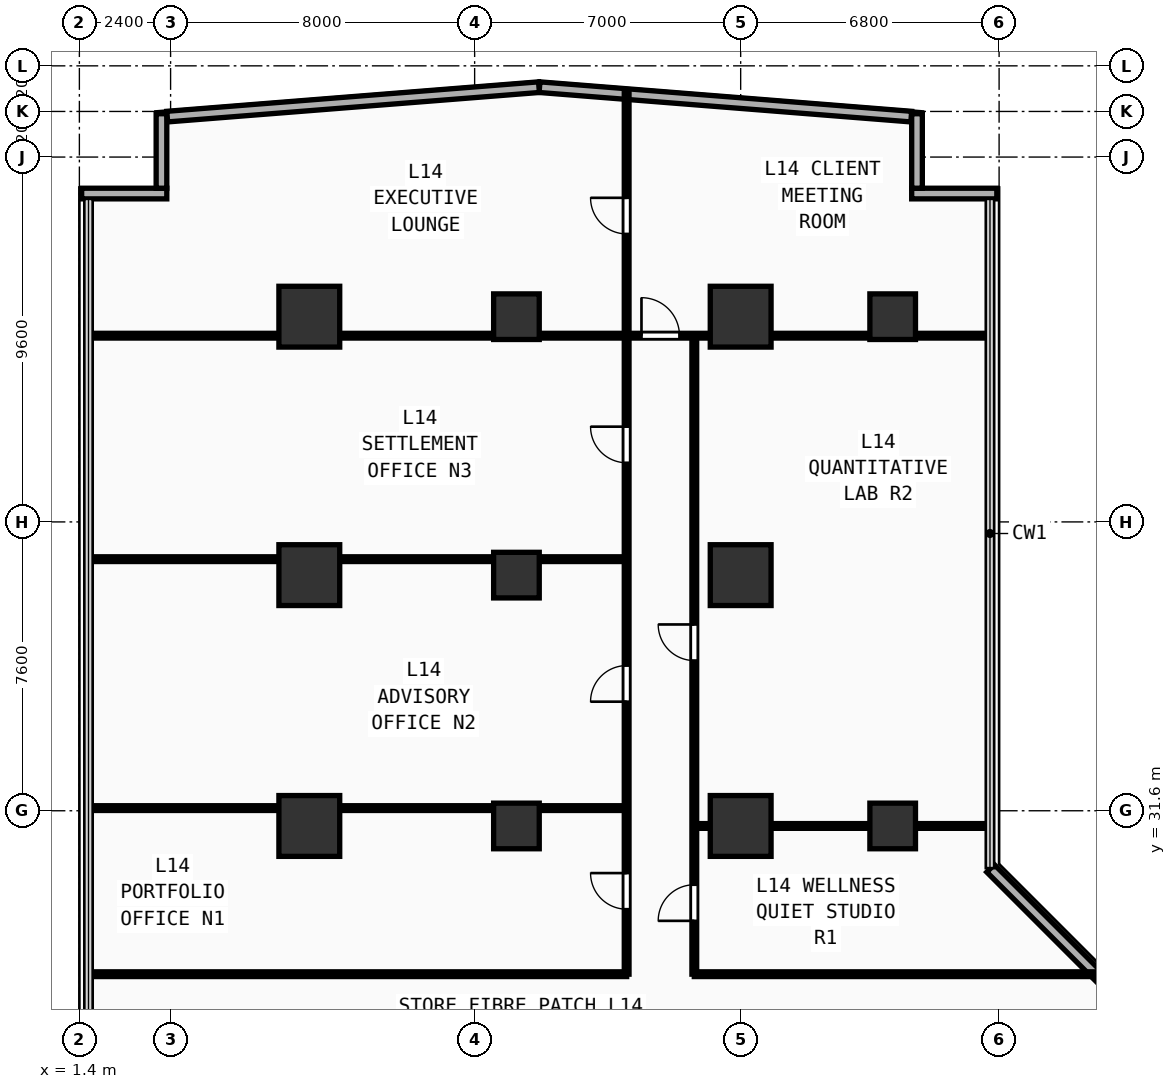
"""IFC4 building model, lengths in metres.
Left out: names, types, materials, properties, quantities, classifications, styles, units other than length and angle.
Written with IfcOpenShell. Run it as: python <this file> out.ifc"""

import sys

from ifc_helpers import new_model, si_unit, direction, frame, frame_2d, origin, origin_2d, place, context, subcontext, project, spatial, rectangle, extrude, element, fill, save


model = new_model("IFC4")
c1 = context("Model", 3, precision=1e-05, world=origin(), true_north=direction((0.0, 1.0)))
c2 = subcontext(c1, "Body", "Model", "MODEL_VIEW")
j1 = project(units=[si_unit("LENGTHUNIT", "METRE"), si_unit("PLANEANGLEUNIT", "RADIAN")], contexts=[c1])
p1 = place(None, origin())
s1 = spatial("IfcSite", under=j1, at=p1, CompositionType="ELEMENT")
p2 = place(p1, origin())
s2 = spatial("IfcBuilding", under=s1, at=p2, CompositionType="ELEMENT")
p3 = place(p2, frame((0.0, 0.0, 56.2)))
s3 = spatial("IfcBuildingStorey", under=s2, at=p3, CompositionType="ELEMENT", Elevation=56.2)
for number, where, z_axis, x_axis in (
    (1, (7.45, 31.2, 0.0), (0.0, 0.0, 1.0), (1.0, 0.0, 0.0)),
    (2, (7.45, 37.8, 0.0), (0.0, 0.0, 1.0), (1.0, 0.0, 0.0)),
    (3, (7.45, 44.6, 0.0), (0.0, 0.0, 1.0), (1.0, 0.0, 0.0)),
    (4, (18.8, 31.2, 0.0), (0.0, 0.0, 1.0), (1.0, 0.0, 0.0)),
    (5, (18.8, 37.8, 0.0), (0.0, 0.0, 1.0), (1.0, 0.0, 0.0)),
    (6, (18.8, 44.6, 0.0), (0.0, 0.0, 1.0), (1.0, 0.0, 0.0)),
):
    element("IfcColumn", number, at=place(p3, frame(where, z_axis=z_axis, x_axis=x_axis)), inside=s3, PredefinedType="COLUMN", context=c2, shape_type="SweptSolid", body=[
        extrude(rectangle(XDim=1.6, YDim=1.6, at=origin_2d()), origin(), (0.0, 0.0, 1.0), 3.54),
    ])
for number, where, z_axis, x_axis in (
    (7, (22.8, 31.2, 0.0), (0.0, 0.0, 1.0), (1.0, 0.0, 0.0)),
    (8, (22.8, 44.6, 0.0), (0.0, 0.0, 1.0), (1.0, 0.0, 0.0)),
    (9, (12.9, 31.2, 0.0), (0.0, 0.0, 1.0), (1.0, 0.0, 0.0)),
    (10, (12.9, 37.8, 0.0), (0.0, 0.0, 1.0), (1.0, 0.0, 0.0)),
    (11, (12.9, 44.6, 0.0), (0.0, 0.0, 1.0), (1.0, 0.0, 0.0)),
):
    element("IfcColumn", number, at=place(p3, frame(where, z_axis=z_axis, x_axis=x_axis)), inside=s3, PredefinedType="COLUMN", context=c2, shape_type="SweptSolid", body=[
        extrude(rectangle(XDim=1.2, YDim=1.2, at=origin_2d()), origin(), (0.0, 0.0, 1.0), 3.54),
    ])
p4 = place(p3, frame((23.3, 47.84, 0.0), z_axis=(0.0, 0.0, 1.0), x_axis=(1.0, 0.0, 0.0)))
e12 = element("IfcWall", 12, at=p4, inside=s3, PredefinedType="SOLIDWALL", context=c2, shape_type="SweptSolid", body=[
    extrude(rectangle(XDim=2.24, YDim=0.28, at=frame_2d((1.12, 0.0))), origin(), (0.0, 0.0, 1.0), 3.54),
])
p5 = place(p3, frame((23.44, 47.98, 0.0), z_axis=(0.0, 0.0, 1.0), x_axis=(0.0, 1.0, 0.0)))
e13 = element("IfcWall", 13, at=p5, inside=s3, PredefinedType="SOLIDWALL", context=c2, shape_type="SweptSolid", body=[
    extrude(rectangle(XDim=1.96, YDim=0.28, at=frame_2d((0.98, 0.0))), origin(), (0.0, 0.0, 1.0), 3.54),
])
p6 = place(p3, frame((1.46, 47.84, 0.0), z_axis=(0.0, 0.0, 1.0), x_axis=(1.0, 0.0, 0.0)))
e14 = element("IfcWall", 14, at=p6, inside=s3, PredefinedType="SOLIDWALL", context=c2, shape_type="SweptSolid", body=[
    extrude(rectangle(XDim=2.24, YDim=0.28, at=frame_2d((1.12, 0.0))), origin(), (0.0, 0.0, 1.0), 3.54),
])
p7 = place(p3, frame((3.56, 47.98, 0.0), z_axis=(0.0, 0.0, 1.0), x_axis=(0.0, 1.0, 0.0)))
e15 = element("IfcWall", 15, at=p7, inside=s3, PredefinedType="SOLIDWALL", context=c2, shape_type="SweptSolid", body=[
    extrude(rectangle(XDim=1.96, YDim=0.28, at=frame_2d((0.98, 0.0))), origin(), (0.0, 0.0, 1.0), 3.54),
])
p8 = place(p3, frame((31.885, 23.575, 0.0), z_axis=(0.0, 0.0, 1.0), x_axis=(-0.707106781187, 0.707106781187, 0.0)))
e16 = element("IfcWall", 16, at=p8, inside=s3, PredefinedType="SOLIDWALL", context=c2, shape_type="SweptSolid", body=[
    extrude(rectangle(XDim=9.207, YDim=0.28, at=frame_2d((4.603, 0.0))), origin(), (0.0, 0.0, 1.0), 3.54),
])
for number, where, z_axis, x_axis in (
    (17, (23.288, 49.864, 0.0), (0.0, 0.0, 1.0), (-0.997, 0.079, 0.0)),
    (18, (13.493, 50.639, 0.0), (0.0, 0.0, 1.0), (-0.997, -0.079, 0.0)),
):
    element("IfcWall", number, at=place(p3, frame(where, z_axis=z_axis, x_axis=x_axis)), inside=s3, PredefinedType="SOLIDWALL", context=c2, shape_type="SweptSolid", body=[
        extrude(rectangle(XDim=9.812, YDim=0.28, at=frame_2d((4.906, 0.0))), origin(), (0.0, 0.0, 1.0), 3.54),
    ])
p9 = place(p3, frame((1.64, 27.3, 0.0), z_axis=(0.0, 0.0, 1.0), x_axis=(1.0, 0.0, 0.0)))
e19 = element("IfcWall", 19, at=p9, inside=s3, PredefinedType="PARTITIONING", context=c2, shape_type="SweptSolid", body=[
    extrude(rectangle(XDim=14.16, YDim=0.125, at=frame_2d((7.08, 0.0))), origin(), (0.0, 0.0, 1.0), 3.54),
])
p10 = place(p3, frame((15.8, 27.3, 0.0), z_axis=(0.0, 0.0, 1.0), x_axis=(0.0, 1.0, 0.0)))
e20 = element("IfcWall", 20, at=p10, inside=s3, PredefinedType="PARTITIONING", context=c2, shape_type="SweptSolid", body=[
    extrude(rectangle(XDim=16.8, YDim=0.125, at=frame_2d((8.4, 0.0))), origin(), (0.0, 0.0, 1.0), 3.54),
])
p11 = place(p10, frame((1.71, 0.0, 0.0)))
e21 = element("IfcOpeningElement", 21, at=p11, cuts=e20, PredefinedType="OPENING", context=c2, shape_type="SweptSolid", body=[
    extrude(rectangle(XDim=0.95, YDim=2.15, at=frame_2d((0.475, 1.075))), frame((0.0, 0.073, 0.0), z_axis=(0.0, -1.0, 0.0), x_axis=(1.0, 0.0, 0.0)), (0.0, 0.0, 1.0), 0.145),
])
p12 = place(p10, frame((7.17, 0.0, 0.0)))
e22 = element("IfcOpeningElement", 22, at=p12, cuts=e20, PredefinedType="OPENING", context=c2, shape_type="SweptSolid", body=[
    extrude(rectangle(XDim=0.95, YDim=2.15, at=frame_2d((0.475, 1.075))), frame((0.0, 0.073, 0.0), z_axis=(0.0, -1.0, 0.0), x_axis=(1.0, 0.0, 0.0)), (0.0, 0.0, 1.0), 0.145),
])
p13 = place(p10, frame((13.456, 0.0, 0.0)))
e23 = element("IfcOpeningElement", 23, at=p13, cuts=e20, PredefinedType="OPENING", context=c2, shape_type="SweptSolid", body=[
    extrude(rectangle(XDim=0.95, YDim=2.15, at=frame_2d((0.475, 1.075))), frame((0.0, 0.073, 0.0), z_axis=(0.0, -1.0, 0.0), x_axis=(1.0, 0.0, 0.0)), (0.0, 0.0, 1.0), 0.145),
])
for number, where, z_axis, x_axis in (
    (24, (1.64, 31.67, 0.0), (0.0, 0.0, 1.0), (1.0, 0.0, 0.0)),
    (25, (1.64, 38.22, 0.0), (0.0, 0.0, 1.0), (1.0, 0.0, 0.0)),
):
    element("IfcWall", number, at=place(p3, frame(where, z_axis=z_axis, x_axis=x_axis)), inside=s3, PredefinedType="PARTITIONING", context=c2, shape_type="SweptSolid", body=[
        extrude(rectangle(XDim=14.16, YDim=0.125, at=frame_2d((7.08, 0.0))), origin(), (0.0, 0.0, 1.0), 3.54),
    ])
p14 = place(p3, frame((1.64, 44.1, 0.0), z_axis=(0.0, 0.0, 1.0), x_axis=(1.0, 0.0, 0.0)))
e26 = element("IfcWall", 26, at=p14, inside=s3, PredefinedType="PARTITIONING", context=c2, shape_type="SweptSolid", body=[
    extrude(rectangle(XDim=23.72, YDim=0.125, at=frame_2d((11.86, 0.0))), origin(), (0.0, 0.0, 1.0), 3.54),
])
p15 = place(p14, frame((14.55, 0.0, 0.0)))
e27 = element("IfcOpeningElement", 27, at=p15, cuts=e26, PredefinedType="OPENING", context=c2, shape_type="SweptSolid", body=[
    extrude(rectangle(XDim=1.0, YDim=2.2, at=frame_2d((0.5, 1.1))), frame((0.0, 0.073, 0.0), z_axis=(0.0, -1.0, 0.0), x_axis=(1.0, 0.0, 0.0)), (0.0, 0.0, 1.0), 0.145),
])
p16 = place(p3, frame((15.8, 44.1, 0.0), z_axis=(0.0, 0.0, 1.0), x_axis=(0.0, 1.0, 0.0)))
e28 = element("IfcWall", 28, at=p16, inside=s3, PredefinedType="PARTITIONING", context=c2, shape_type="SweptSolid", body=[
    extrude(rectangle(XDim=6.46, YDim=0.125, at=frame_2d((3.23, 0.0))), origin(), (0.0, 0.0, 1.0), 3.54),
])
p17 = place(p16, frame((2.677, 0.0, 0.0)))
e29 = element("IfcOpeningElement", 29, at=p17, cuts=e28, PredefinedType="OPENING", context=c2, shape_type="SweptSolid", body=[
    extrude(rectangle(XDim=0.95, YDim=2.15, at=frame_2d((0.475, 1.075))), frame((0.0, 0.073, 0.0), z_axis=(0.0, -1.0, 0.0), x_axis=(1.0, 0.0, 0.0)), (0.0, 0.0, 1.0), 0.145),
])
p18 = place(p3, frame((17.58, 27.3, 0.0), z_axis=(0.0, 0.0, 1.0), x_axis=(1.0, 0.0, 0.0)))
e30 = element("IfcWall", 30, at=p18, inside=s3, PredefinedType="PARTITIONING", context=c2, shape_type="SweptSolid", body=[
    extrude(rectangle(XDim=10.68, YDim=0.125, at=frame_2d((5.34, 0.0))), origin(), (0.0, 0.0, 1.0), 3.54),
])
p19 = place(p3, frame((17.58, 27.3, 0.0), z_axis=(0.0, 0.0, 1.0), x_axis=(0.0, 1.0, 0.0)))
e31 = element("IfcWall", 31, at=p19, inside=s3, PredefinedType="PARTITIONING", context=c2, shape_type="SweptSolid", body=[
    extrude(rectangle(XDim=16.8, YDim=0.125, at=frame_2d((8.4, 0.0))), origin(), (0.0, 0.0, 1.0), 3.54),
])
p20 = place(p19, frame((1.403, 0.0, 0.0)))
e32 = element("IfcOpeningElement", 32, at=p20, cuts=e31, PredefinedType="OPENING", context=c2, shape_type="SweptSolid", body=[
    extrude(rectangle(XDim=0.95, YDim=2.15, at=frame_2d((0.475, 1.075))), frame((0.0, 0.073, 0.0), z_axis=(0.0, -1.0, 0.0), x_axis=(1.0, 0.0, 0.0)), (0.0, 0.0, 1.0), 0.145),
])
p21 = place(p19, frame((8.252, 0.0, 0.0)))
e33 = element("IfcOpeningElement", 33, at=p21, cuts=e31, PredefinedType="OPENING", context=c2, shape_type="SweptSolid", body=[
    extrude(rectangle(XDim=0.95, YDim=2.15, at=frame_2d((0.475, 1.075))), frame((0.0, 0.073, 0.0), z_axis=(0.0, -1.0, 0.0), x_axis=(1.0, 0.0, 0.0)), (0.0, 0.0, 1.0), 0.145),
])
p22 = place(p3, frame((17.58, 31.2, 0.0), z_axis=(0.0, 0.0, 1.0), x_axis=(1.0, 0.0, 0.0)))
e34 = element("IfcWall", 34, at=p22, inside=s3, PredefinedType="PARTITIONING", context=c2, shape_type="SweptSolid", body=[
    extrude(rectangle(XDim=7.78, YDim=0.125, at=frame_2d((3.89, 0.0))), origin(), (0.0, 0.0, 1.0), 2.94),
])
p23 = place(p11, origin())
e35 = element("IfcDoor", 35, at=p23, inside=s3, OperationType="SINGLE_SWING_RIGHT", PredefinedType="DOOR", context=c2, shape_type="SweptSolid", body=[
    extrude(rectangle(XDim=0.95, YDim=2.15, at=frame_2d((0.475, 1.075))), frame((0.0, 0.025, 0.0), z_axis=(0.0, -1.0, 0.0), x_axis=(1.0, 0.0, 0.0)), (0.0, 0.0, 1.0), 0.05),
])
fill(e21, e35)
p24 = place(p12, origin())
e36 = element("IfcDoor", 36, at=p24, inside=s3, OperationType="SINGLE_SWING_LEFT", PredefinedType="DOOR", context=c2, shape_type="SweptSolid", body=[
    extrude(rectangle(XDim=0.95, YDim=2.15, at=frame_2d((0.475, 1.075))), frame((0.0, 0.025, 0.0), z_axis=(0.0, -1.0, 0.0), x_axis=(1.0, 0.0, 0.0)), (0.0, 0.0, 1.0), 0.05),
])
fill(e22, e36)
p25 = place(p13, origin())
e37 = element("IfcDoor", 37, at=p25, inside=s3, OperationType="SINGLE_SWING_RIGHT", PredefinedType="DOOR", context=c2, shape_type="SweptSolid", body=[
    extrude(rectangle(XDim=0.95, YDim=2.15, at=frame_2d((0.475, 1.075))), frame((0.0, 0.025, 0.0), z_axis=(0.0, -1.0, 0.0), x_axis=(1.0, 0.0, 0.0)), (0.0, 0.0, 1.0), 0.05),
])
fill(e23, e37)
p26 = place(p15, origin())
e38 = element("IfcDoor", 38, at=p26, inside=s3, OperationType="SINGLE_SWING_LEFT", PredefinedType="DOOR", context=c2, shape_type="SweptSolid", body=[
    extrude(rectangle(XDim=1.0, YDim=2.2, at=frame_2d((0.5, 1.1))), frame((0.0, 0.025, 0.0), z_axis=(0.0, -1.0, 0.0), x_axis=(1.0, 0.0, 0.0)), (0.0, 0.0, 1.0), 0.05),
])
fill(e27, e38)
p27 = place(p17, origin())
e39 = element("IfcDoor", 39, at=p27, inside=s3, OperationType="SINGLE_SWING_RIGHT", PredefinedType="DOOR", context=c2, shape_type="SweptSolid", body=[
    extrude(rectangle(XDim=0.95, YDim=2.15, at=frame_2d((0.475, 1.075))), frame((0.0, 0.025, 0.0), z_axis=(0.0, -1.0, 0.0), x_axis=(1.0, 0.0, 0.0)), (0.0, 0.0, 1.0), 0.05),
])
fill(e29, e39)
p28 = place(p20, origin())
e40 = element("IfcDoor", 40, at=p28, inside=s3, OperationType="SINGLE_SWING_LEFT", PredefinedType="DOOR", context=c2, shape_type="SweptSolid", body=[
    extrude(rectangle(XDim=0.95, YDim=2.15, at=frame_2d((0.475, 1.075))), frame((0.0, 0.025, 0.0), z_axis=(0.0, -1.0, 0.0), x_axis=(1.0, 0.0, 0.0)), (0.0, 0.0, 1.0), 0.05),
])
fill(e32, e40)
p29 = place(p21, origin())
e41 = element("IfcDoor", 41, at=p29, inside=s3, OperationType="SINGLE_SWING_RIGHT", PredefinedType="DOOR", context=c2, shape_type="SweptSolid", body=[
    extrude(rectangle(XDim=0.95, YDim=2.15, at=frame_2d((0.475, 1.075))), frame((0.0, 0.025, 0.0), z_axis=(0.0, -1.0, 0.0), x_axis=(1.0, 0.0, 0.0)), (0.0, 0.0, 1.0), 0.05),
])
fill(e33, e41)
save(model, sys.argv[1])
